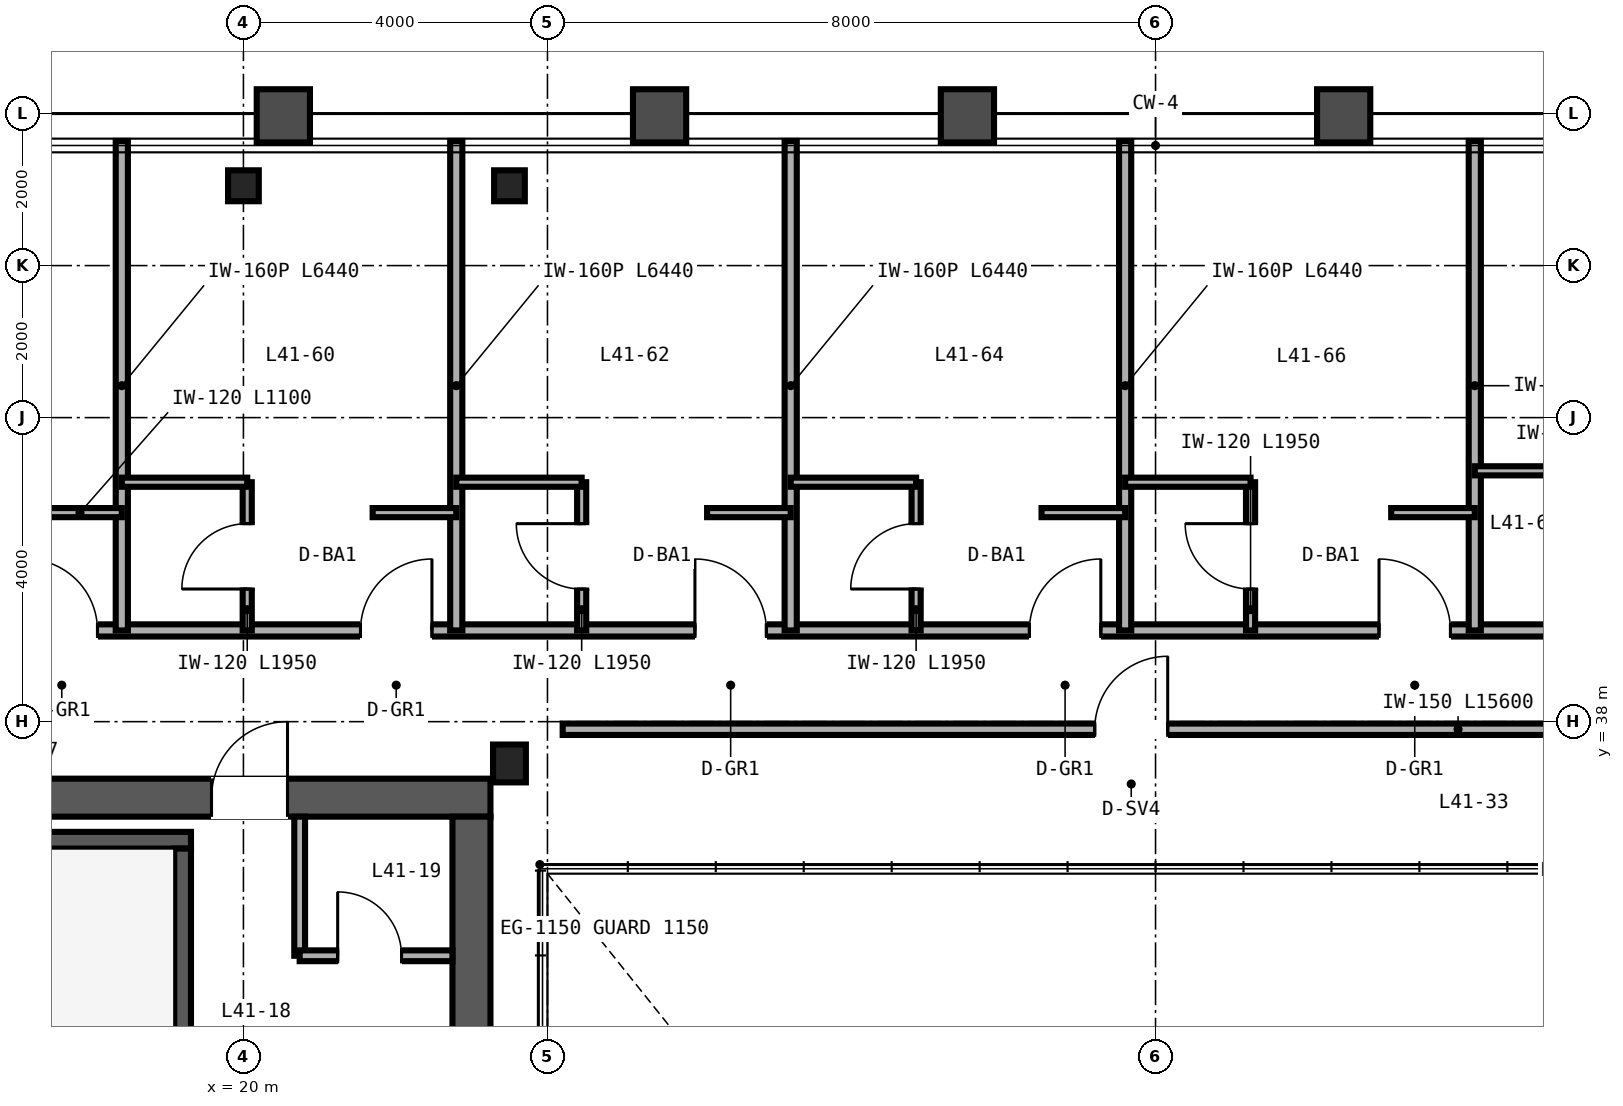
"""IFC4 building model, lengths in metres.
Left out: names, types, materials, properties, quantities, classifications, styles, units other than length and angle.
Written with IfcOpenShell. Run it as: python <this file> out.ifc"""

import sys

from ifc_helpers import new_model, si_unit, direction, frame, frame_2d, origin, origin_2d, place, context, subcontext, project, spatial, rectangle, i_section, extrude, source, transform, mapped, element, fill, save


model = new_model("IFC4")
c1 = context("Model", 3, precision=1e-05, world=origin(), true_north=direction((0.0, 1.0)))
c2 = subcontext(c1, "Body", "Model", "MODEL_VIEW")
j1 = project(units=[si_unit("LENGTHUNIT", "METRE"), si_unit("PLANEANGLEUNIT", "RADIAN")], contexts=[c1])
p1 = place(None, origin())
s1 = spatial("IfcSite", under=j1, at=p1, CompositionType="ELEMENT")
p2 = place(p1, origin())
s2 = spatial("IfcBuilding", under=s1, at=p2, CompositionType="ELEMENT")
p3 = place(p2, frame((0.0, 0.0, 166.8)))
s3 = spatial("IfcBuildingStorey", under=s2, at=p3, CompositionType="ELEMENT", Elevation=166.8)
p4 = place(p3, frame((10.75, 37.0, 0.0), z_axis=(0.0, 0.0, 1.0), x_axis=(1.0, 0.0, 0.0)))
e1 = element("IfcWall", 1, at=p4, inside=s3, PredefinedType="SHEAR", context=c2, shape_type="SweptSolid", body=[
    extrude(rectangle(XDim=12.5, YDim=0.5, at=frame_2d((6.25, 0.0))), origin(), (0.0, 0.0, 1.0), 3.37),
])
p5 = place(p4, frame((8.83, 0.0, 0.0)))
e2 = element("IfcOpeningElement", 2, at=p5, cuts=e1, PredefinedType="OPENING", context=c2, shape_type="SweptSolid", body=[
    extrude(rectangle(XDim=1.0, YDim=2.15, at=frame_2d((0.5, 1.075))), frame((0.0, 0.26, 0.0), z_axis=(0.0, -1.0, 0.0), x_axis=(1.0, 0.0, 0.0)), (0.0, 0.0, 1.0), 0.52),
])
p6 = place(p3, frame((23.0, 15.25, 0.0), z_axis=(0.0, 0.0, 1.0), x_axis=(0.0, 1.0, 0.0)))
e3 = element("IfcWall", 3, at=p6, inside=s3, PredefinedType="SHEAR", context=c2, shape_type="SweptSolid", body=[
    extrude(rectangle(XDim=21.5, YDim=0.5, at=frame_2d((10.75, 0.0))), origin(), (0.0, 0.0, 1.0), 3.37),
])
p7 = place(p3, frame((11.25, 36.44, 0.0), z_axis=(0.0, 0.0, 1.0), x_axis=(1.0, 0.0, 0.0)))
e4 = element("IfcWall", 4, at=p7, inside=s3, PredefinedType="SHEAR", context=c2, shape_type="SweptSolid", body=[
    extrude(rectangle(XDim=8.06, YDim=0.22, at=frame_2d((4.03, 0.0))), origin(), (0.0, 0.0, 1.0), 3.4),
])
p8 = place(p3, frame((19.2, 33.05, 0.0), z_axis=(0.0, 0.0, 1.0), x_axis=(0.0, 1.0, 0.0)))
e5 = element("IfcWall", 5, at=p8, inside=s3, PredefinedType="SHEAR", context=c2, shape_type="SweptSolid", body=[
    extrude(rectangle(XDim=3.28, YDim=0.22, at=frame_2d((1.64, 0.0))), origin(), (0.0, 0.0, 1.0), 3.4),
])
m1 = source(origin(), c2, "Body", "SweptSolid", [
    extrude(i_section(OverallWidth=0.432, OverallDepth=0.498, WebThickness=0.056, FlangeThickness=0.089, FilletRadius=0.025, at=origin_2d()), origin(), (0.0, 0.0, 1.0), 3.37),
])
p9 = place(p3, frame((23.5, 37.45, 0.0), z_axis=(0.0, 0.0, 1.0), x_axis=(1.0, 0.0, 0.0)))
e6 = element("IfcColumn", 6, at=p9, inside=s3, PredefinedType="COLUMN", context=c2, shape_type="MappedRepresentation", body=[
    mapped(m1, transform((0.0, 0.0, 0.0), scale=1.0)),
])
m2 = source(origin(), c2, "Body", "SweptSolid", [
    extrude(i_section(OverallWidth=0.404, OverallDepth=0.407, WebThickness=0.027, FlangeThickness=0.044, FilletRadius=0.025, at=origin_2d()), origin(), (0.0, 0.0, 1.0), 3.37),
])
for number, where, z_axis, x_axis in (
    (7, (20.0, 45.05, 0.0), (0.0, 0.0, 1.0), (1.0, 0.0, 0.0)),
    (8, (23.5, 45.05, 0.0), (0.0, 0.0, 1.0), (1.0, 0.0, 0.0)),
):
    element("IfcColumn", number, at=place(p3, frame(where, z_axis=z_axis, x_axis=x_axis)), inside=s3, PredefinedType="COLUMN", context=c2, shape_type="MappedRepresentation", body=[
        mapped(m2, transform((0.0, 0.0, 0.0), scale=1.0)),
    ])
p10 = place(p3, frame((20.74, 34.92, 0.0), z_axis=(0.0, 0.0, 1.0), x_axis=(0.0, 1.0, 0.0)))
e9 = element("IfcWall", 9, at=p10, inside=s3, PredefinedType="PARTITIONING", context=c2, shape_type="SweptSolid", body=[
    extrude(rectangle(XDim=1.83, YDim=0.142, at=frame_2d((0.915, 0.0))), origin(), (0.0, 0.0, 1.0), 3.37),
])
p11 = place(p3, frame((20.74, 34.92, 0.0), z_axis=(0.0, 0.0, 1.0), x_axis=(1.0, 0.0, 0.0)))
e10 = element("IfcWall", 10, at=p11, inside=s3, PredefinedType="PARTITIONING", context=c2, shape_type="SweptSolid", body=[
    extrude(rectangle(XDim=2.01, YDim=0.142, at=frame_2d((1.005, 0.0))), origin(), (0.0, 0.0, 1.0), 3.37),
])
p12 = place(p11, frame((0.5, 0.0, 0.0)))
e11 = element("IfcOpeningElement", 11, at=p12, cuts=e10, PredefinedType="OPENING", context=c2, shape_type="SweptSolid", body=[
    extrude(rectangle(XDim=0.84, YDim=2.1, at=frame_2d((0.42, 1.05))), frame((0.0, 0.081, 0.0), z_axis=(0.0, -1.0, 0.0), x_axis=(1.0, 0.0, 0.0)), (0.0, 0.0, 1.0), 0.162),
])
p13 = place(p3, frame((24.2, 37.9, 0.0), z_axis=(0.0, 0.0, 1.0), x_axis=(1.0, 0.0, 0.0)))
e12 = element("IfcWall", 12, at=p13, inside=s3, PredefinedType="PARTITIONING", context=c2, shape_type="SweptSolid", body=[
    extrude(rectangle(XDim=15.6, YDim=0.15, at=frame_2d((7.8, 0.0))), origin(), (0.0, 0.0, 1.0), 3.37),
])
p14 = place(p13, frame((7.0, 0.0, 0.0)))
e13 = element("IfcOpeningElement", 13, at=p14, cuts=e12, PredefinedType="OPENING", context=c2, shape_type="SweptSolid", body=[
    extrude(rectangle(XDim=0.96, YDim=2.15, at=frame_2d((0.48, 1.075))), frame((0.0, 0.085, 0.0), z_axis=(0.0, -1.0, 0.0), x_axis=(1.0, 0.0, 0.0)), (0.0, 0.0, 1.0), 0.17),
])
p15 = place(p3, frame((14.0, 39.2, 0.0), z_axis=(0.0, 0.0, 1.0), x_axis=(1.0, 0.0, 0.0)))
e14 = element("IfcWall", 14, at=p15, inside=s3, PredefinedType="PARTITIONING", context=c2, shape_type="SweptSolid", body=[
    extrude(rectangle(XDim=36.0, YDim=0.16, at=frame_2d((18.0, 0.0))), origin(), (0.0, 0.0, 1.0), 2.913),
])
p16 = place(p15, frame((3.14, 0.0, 0.0)))
e15 = element("IfcOpeningElement", 15, at=p16, cuts=e14, PredefinedType="OPENING", context=c2, shape_type="SweptSolid", body=[
    extrude(rectangle(XDim=0.94, YDim=2.15, at=frame_2d((0.47, 1.075))), frame((0.0, 0.09, 0.0), z_axis=(0.0, -1.0, 0.0), x_axis=(1.0, 0.0, 0.0)), (0.0, 0.0, 1.0), 0.18),
])
p17 = place(p15, frame((7.54, 0.0, 0.0)))
e16 = element("IfcOpeningElement", 16, at=p17, cuts=e14, PredefinedType="OPENING", context=c2, shape_type="SweptSolid", body=[
    extrude(rectangle(XDim=0.94, YDim=2.15, at=frame_2d((0.47, 1.075))), frame((0.0, 0.09, 0.0), z_axis=(0.0, -1.0, 0.0), x_axis=(1.0, 0.0, 0.0)), (0.0, 0.0, 1.0), 0.18),
])
p18 = place(p15, frame((11.94, 0.0, 0.0)))
e17 = element("IfcOpeningElement", 17, at=p18, cuts=e14, PredefinedType="OPENING", context=c2, shape_type="SweptSolid", body=[
    extrude(rectangle(XDim=0.94, YDim=2.15, at=frame_2d((0.47, 1.075))), frame((0.0, 0.09, 0.0), z_axis=(0.0, -1.0, 0.0), x_axis=(1.0, 0.0, 0.0)), (0.0, 0.0, 1.0), 0.18),
])
p19 = place(p15, frame((16.34, 0.0, 0.0)))
e18 = element("IfcOpeningElement", 18, at=p19, cuts=e14, PredefinedType="OPENING", context=c2, shape_type="SweptSolid", body=[
    extrude(rectangle(XDim=0.94, YDim=2.15, at=frame_2d((0.47, 1.075))), frame((0.0, 0.09, 0.0), z_axis=(0.0, -1.0, 0.0), x_axis=(1.0, 0.0, 0.0)), (0.0, 0.0, 1.0), 0.18),
])
p20 = place(p15, frame((20.94, 0.0, 0.0)))
e19 = element("IfcOpeningElement", 19, at=p20, cuts=e14, PredefinedType="OPENING", context=c2, shape_type="SweptSolid", body=[
    extrude(rectangle(XDim=0.94, YDim=2.15, at=frame_2d((0.47, 1.075))), frame((0.0, 0.09, 0.0), z_axis=(0.0, -1.0, 0.0), x_axis=(1.0, 0.0, 0.0)), (0.0, 0.0, 1.0), 0.18),
])
p21 = place(p15, frame((25.74, 0.0, 0.0)))
e20 = element("IfcOpeningElement", 20, at=p21, cuts=e14, PredefinedType="OPENING", context=c2, shape_type="SweptSolid", body=[
    extrude(rectangle(XDim=0.94, YDim=2.15, at=frame_2d((0.47, 1.075))), frame((0.0, 0.09, 0.0), z_axis=(0.0, -1.0, 0.0), x_axis=(1.0, 0.0, 0.0)), (0.0, 0.0, 1.0), 0.18),
])
p22 = place(p15, frame((30.24, 0.0, 0.0)))
e21 = element("IfcOpeningElement", 21, at=p22, cuts=e14, PredefinedType="OPENING", context=c2, shape_type="SweptSolid", body=[
    extrude(rectangle(XDim=0.94, YDim=2.15, at=frame_2d((0.47, 1.075))), frame((0.0, 0.09, 0.0), z_axis=(0.0, -1.0, 0.0), x_axis=(1.0, 0.0, 0.0)), (0.0, 0.0, 1.0), 0.18),
])
p23 = place(p15, frame((34.74, 0.0, 0.0)))
e22 = element("IfcOpeningElement", 22, at=p23, cuts=e14, PredefinedType="OPENING", context=c2, shape_type="SweptSolid", body=[
    extrude(rectangle(XDim=0.94, YDim=2.15, at=frame_2d((0.47, 1.075))), frame((0.0, 0.09, 0.0), z_axis=(0.0, -1.0, 0.0), x_axis=(1.0, 0.0, 0.0)), (0.0, 0.0, 1.0), 0.18),
])
p24 = place(p3, frame((18.4, 39.2, 0.0), z_axis=(0.0, 0.0, 1.0), x_axis=(0.0, 1.0, 0.0)))
e23 = element("IfcWall", 23, at=p24, inside=s3, PredefinedType="PARTITIONING", context=c2, shape_type="SweptSolid", body=[
    extrude(rectangle(XDim=6.44, YDim=0.16, at=frame_2d((3.22, 0.0))), origin(), (0.0, 0.0, 1.0), 2.677),
])
p25 = place(p3, frame((17.3, 40.75, 0.0), z_axis=(0.0, 0.0, 1.0), x_axis=(1.0, 0.0, 0.0)))
e24 = element("IfcWall", 24, at=p25, inside=s3, PredefinedType="PARTITIONING", context=c2, shape_type="SweptSolid", body=[
    extrude(rectangle(XDim=1.1, YDim=0.12, at=frame_2d((0.55, 0.0))), origin(), (0.0, 0.0, 1.0), 3.37),
])
p26 = place(p3, frame((22.8, 39.2, 0.0), z_axis=(0.0, 0.0, 1.0), x_axis=(0.0, 1.0, 0.0)))
e25 = element("IfcWall", 25, at=p26, inside=s3, PredefinedType="PARTITIONING", context=c2, shape_type="SweptSolid", body=[
    extrude(rectangle(XDim=6.44, YDim=0.16, at=frame_2d((3.22, 0.0))), origin(), (0.0, 0.0, 1.0), 2.833),
])
p27 = place(p3, frame((20.05, 39.2, 0.0), z_axis=(0.0, 0.0, 1.0), x_axis=(0.0, 1.0, 0.0)))
e26 = element("IfcWall", 26, at=p27, inside=s3, PredefinedType="PARTITIONING", context=c2, shape_type="SweptSolid", body=[
    extrude(rectangle(XDim=1.95, YDim=0.12, at=frame_2d((0.975, 0.0))), origin(), (0.0, 0.0, 1.0), 3.37),
])
p28 = place(p27, frame((0.545, 0.0, 0.0)))
e27 = element("IfcOpeningElement", 27, at=p28, cuts=e26, PredefinedType="OPENING", context=c2, shape_type="SweptSolid", body=[
    extrude(rectangle(XDim=0.86, YDim=2.1, at=frame_2d((0.43, 1.05))), frame((0.0, 0.07, 0.0), z_axis=(0.0, -1.0, 0.0), x_axis=(1.0, 0.0, 0.0)), (0.0, 0.0, 1.0), 0.14),
])
p29 = place(p3, frame((18.4, 41.15, 0.0), z_axis=(0.0, 0.0, 1.0), x_axis=(1.0, 0.0, 0.0)))
e28 = element("IfcWall", 28, at=p29, inside=s3, PredefinedType="PARTITIONING", context=c2, shape_type="SweptSolid", body=[
    extrude(rectangle(XDim=1.65, YDim=0.12, at=frame_2d((0.825, 0.0))), origin(), (0.0, 0.0, 1.0), 3.37),
])
p30 = place(p3, frame((21.7, 40.75, 0.0), z_axis=(0.0, 0.0, 1.0), x_axis=(1.0, 0.0, 0.0)))
e29 = element("IfcWall", 29, at=p30, inside=s3, PredefinedType="PARTITIONING", context=c2, shape_type="SweptSolid", body=[
    extrude(rectangle(XDim=1.1, YDim=0.12, at=frame_2d((0.55, 0.0))), origin(), (0.0, 0.0, 1.0), 3.37),
])
p31 = place(p3, frame((27.2, 39.2, 0.0), z_axis=(0.0, 0.0, 1.0), x_axis=(0.0, 1.0, 0.0)))
e30 = element("IfcWall", 30, at=p31, inside=s3, PredefinedType="PARTITIONING", context=c2, shape_type="SweptSolid", body=[
    extrude(rectangle(XDim=6.44, YDim=0.16, at=frame_2d((3.22, 0.0))), origin(), (0.0, 0.0, 1.0), 2.443),
])
p32 = place(p3, frame((24.45, 39.2, 0.0), z_axis=(0.0, 0.0, 1.0), x_axis=(0.0, 1.0, 0.0)))
e31 = element("IfcWall", 31, at=p32, inside=s3, PredefinedType="PARTITIONING", context=c2, shape_type="SweptSolid", body=[
    extrude(rectangle(XDim=1.95, YDim=0.12, at=frame_2d((0.975, 0.0))), origin(), (0.0, 0.0, 1.0), 3.37),
])
p33 = place(p32, frame((0.545, 0.0, 0.0)))
e32 = element("IfcOpeningElement", 32, at=p33, cuts=e31, PredefinedType="OPENING", context=c2, shape_type="SweptSolid", body=[
    extrude(rectangle(XDim=0.86, YDim=2.1, at=frame_2d((0.43, 1.05))), frame((0.0, 0.07, 0.0), z_axis=(0.0, -1.0, 0.0), x_axis=(1.0, 0.0, 0.0)), (0.0, 0.0, 1.0), 0.14),
])
p34 = place(p3, frame((22.8, 41.15, 0.0), z_axis=(0.0, 0.0, 1.0), x_axis=(1.0, 0.0, 0.0)))
e33 = element("IfcWall", 33, at=p34, inside=s3, PredefinedType="PARTITIONING", context=c2, shape_type="SweptSolid", body=[
    extrude(rectangle(XDim=1.65, YDim=0.12, at=frame_2d((0.825, 0.0))), origin(), (0.0, 0.0, 1.0), 2.913),
])
p35 = place(p3, frame((26.1, 40.75, 0.0), z_axis=(0.0, 0.0, 1.0), x_axis=(1.0, 0.0, 0.0)))
e34 = element("IfcWall", 34, at=p35, inside=s3, PredefinedType="PARTITIONING", context=c2, shape_type="SweptSolid", body=[
    extrude(rectangle(XDim=1.1, YDim=0.12, at=frame_2d((0.55, 0.0))), origin(), (0.0, 0.0, 1.0), 3.37),
])
p36 = place(p3, frame((31.6, 39.2, 0.0), z_axis=(0.0, 0.0, 1.0), x_axis=(0.0, 1.0, 0.0)))
e35 = element("IfcWall", 35, at=p36, inside=s3, PredefinedType="PARTITIONING", context=c2, shape_type="SweptSolid", body=[
    extrude(rectangle(XDim=6.44, YDim=0.16, at=frame_2d((3.22, 0.0))), origin(), (0.0, 0.0, 1.0), 2.443),
])
p37 = place(p3, frame((28.85, 39.2, 0.0), z_axis=(0.0, 0.0, 1.0), x_axis=(0.0, 1.0, 0.0)))
e36 = element("IfcWall", 36, at=p37, inside=s3, PredefinedType="PARTITIONING", context=c2, shape_type="SweptSolid", body=[
    extrude(rectangle(XDim=1.95, YDim=0.12, at=frame_2d((0.975, 0.0))), origin(), (0.0, 0.0, 1.0), 3.37),
])
p38 = place(p37, frame((0.545, 0.0, 0.0)))
e37 = element("IfcOpeningElement", 37, at=p38, cuts=e36, PredefinedType="OPENING", context=c2, shape_type="SweptSolid", body=[
    extrude(rectangle(XDim=0.86, YDim=2.1, at=frame_2d((0.43, 1.05))), frame((0.0, 0.07, 0.0), z_axis=(0.0, -1.0, 0.0), x_axis=(1.0, 0.0, 0.0)), (0.0, 0.0, 1.0), 0.14),
])
p39 = place(p3, frame((27.2, 41.15, 0.0), z_axis=(0.0, 0.0, 1.0), x_axis=(1.0, 0.0, 0.0)))
e38 = element("IfcWall", 38, at=p39, inside=s3, PredefinedType="PARTITIONING", context=c2, shape_type="SweptSolid", body=[
    extrude(rectangle(XDim=1.65, YDim=0.12, at=frame_2d((0.825, 0.0))), origin(), (0.0, 0.0, 1.0), 3.37),
])
p40 = place(p3, frame((30.5, 40.75, 0.0), z_axis=(0.0, 0.0, 1.0), x_axis=(1.0, 0.0, 0.0)))
e39 = element("IfcWall", 39, at=p40, inside=s3, PredefinedType="PARTITIONING", context=c2, shape_type="SweptSolid", body=[
    extrude(rectangle(XDim=1.1, YDim=0.12, at=frame_2d((0.55, 0.0))), origin(), (0.0, 0.0, 1.0), 3.37),
])
p41 = place(p3, frame((36.2, 39.2, 0.0), z_axis=(0.0, 0.0, 1.0), x_axis=(0.0, 1.0, 0.0)))
e40 = element("IfcWall", 40, at=p41, inside=s3, PredefinedType="PARTITIONING", context=c2, shape_type="SweptSolid", body=[
    extrude(rectangle(XDim=6.44, YDim=0.16, at=frame_2d((3.22, 0.0))), origin(), (0.0, 0.0, 1.0), 2.443),
])
p42 = place(p3, frame((33.25, 39.2, 0.0), z_axis=(0.0, 0.0, 1.0), x_axis=(0.0, 1.0, 0.0)))
e41 = element("IfcWall", 41, at=p42, inside=s3, PredefinedType="PARTITIONING", context=c2, shape_type="SweptSolid", body=[
    extrude(rectangle(XDim=1.95, YDim=0.12, at=frame_2d((0.975, 0.0))), origin(), (0.0, 0.0, 1.0), 3.37),
])
p43 = place(p42, frame((0.545, 0.0, 0.0)))
e42 = element("IfcOpeningElement", 42, at=p43, cuts=e41, PredefinedType="OPENING", context=c2, shape_type="SweptSolid", body=[
    extrude(rectangle(XDim=0.86, YDim=2.1, at=frame_2d((0.43, 1.05))), frame((0.0, 0.07, 0.0), z_axis=(0.0, -1.0, 0.0), x_axis=(1.0, 0.0, 0.0)), (0.0, 0.0, 1.0), 0.14),
])
p44 = place(p3, frame((31.6, 41.15, 0.0), z_axis=(0.0, 0.0, 1.0), x_axis=(1.0, 0.0, 0.0)))
e43 = element("IfcWall", 43, at=p44, inside=s3, PredefinedType="PARTITIONING", context=c2, shape_type="SweptSolid", body=[
    extrude(rectangle(XDim=1.65, YDim=0.12, at=frame_2d((0.825, 0.0))), origin(), (0.0, 0.0, 1.0), 3.37),
])
p45 = place(p3, frame((35.1, 40.75, 0.0), z_axis=(0.0, 0.0, 1.0), x_axis=(1.0, 0.0, 0.0)))
e44 = element("IfcWall", 44, at=p45, inside=s3, PredefinedType="PARTITIONING", context=c2, shape_type="SweptSolid", body=[
    extrude(rectangle(XDim=1.1, YDim=0.12, at=frame_2d((0.55, 0.0))), origin(), (0.0, 0.0, 1.0), 3.37),
])
p46 = place(p3, frame((36.2, 41.3, 0.0), z_axis=(0.0, 0.0, 1.0), x_axis=(1.0, 0.0, 0.0)))
e45 = element("IfcWall", 45, at=p46, inside=s3, PredefinedType="PARTITIONING", context=c2, shape_type="SweptSolid", body=[
    extrude(rectangle(XDim=1.95, YDim=0.12, at=frame_2d((0.975, 0.0))), origin(), (0.0, 0.0, 1.0), 3.37),
])
m3 = source(origin(), c2, "Body", "SweptSolid", [
    extrude(rectangle(XDim=0.84, YDim=2.1, at=frame_2d((0.42, 1.05))), frame((0.0, 0.025, 0.0), z_axis=(0.0, -1.0, 0.0), x_axis=(1.0, 0.0, 0.0)), (0.0, 0.0, 1.0), 0.05),
])
p47 = place(p12, origin())
e46 = element("IfcDoor", 46, at=p47, inside=s3, OperationType="SINGLE_SWING_LEFT", PredefinedType="DOOR", context=c2, shape_type="MappedRepresentation", body=[
    mapped(m3, transform((0.0, 0.0, 0.0), scale=1.0)),
])
fill(e11, e46)
m4 = source(origin(), c2, "Body", "SweptSolid", [
    extrude(rectangle(XDim=1.0, YDim=2.15, at=frame_2d((0.5, 1.075))), frame((0.0, 0.025, 0.0), z_axis=(0.0, -1.0, 0.0), x_axis=(1.0, 0.0, 0.0)), (0.0, 0.0, 1.0), 0.05),
])
p48 = place(p5, origin())
e47 = element("IfcDoor", 47, at=p48, inside=s3, OperationType="SINGLE_SWING_RIGHT", PredefinedType="DOOR", context=c2, shape_type="MappedRepresentation", body=[
    mapped(m4, transform((0.0, 0.0, 0.0), scale=1.0)),
])
fill(e2, e47)
m5 = source(origin(), c2, "Body", "SweptSolid", [
    extrude(rectangle(XDim=0.96, YDim=2.15, at=frame_2d((0.48, 1.075))), frame((0.0, 0.025, 0.0), z_axis=(0.0, -1.0, 0.0), x_axis=(1.0, 0.0, 0.0)), (0.0, 0.0, 1.0), 0.05),
])
p49 = place(p14, origin())
e48 = element("IfcDoor", 48, at=p49, inside=s3, OperationType="SINGLE_SWING_RIGHT", PredefinedType="DOOR", context=c2, shape_type="MappedRepresentation", body=[
    mapped(m5, transform((0.0, 0.0, 0.0), scale=1.0)),
])
fill(e13, e48)
m6 = source(origin(), c2, "Body", "SweptSolid", [
    extrude(rectangle(XDim=0.86, YDim=2.1, at=frame_2d((0.43, 1.05))), frame((0.0, 0.025, 0.0), z_axis=(0.0, -1.0, 0.0), x_axis=(1.0, 0.0, 0.0)), (0.0, 0.0, 1.0), 0.05),
])
p50 = place(p28, origin())
e49 = element("IfcDoor", 49, at=p50, inside=s3, OperationType="SINGLE_SWING_LEFT", PredefinedType="DOOR", context=c2, shape_type="MappedRepresentation", body=[
    mapped(m6, transform((0.0, 0.0, 0.0), scale=1.0)),
])
fill(e27, e49)
p51 = place(p33, origin())
e50 = element("IfcDoor", 50, at=p51, inside=s3, OperationType="SINGLE_SWING_RIGHT", PredefinedType="DOOR", context=c2, shape_type="MappedRepresentation", body=[
    mapped(m6, transform((0.0, 0.0, 0.0), scale=1.0)),
])
fill(e32, e50)
p52 = place(p38, origin())
e51 = element("IfcDoor", 51, at=p52, inside=s3, OperationType="SINGLE_SWING_LEFT", PredefinedType="DOOR", context=c2, shape_type="MappedRepresentation", body=[
    mapped(m6, transform((0.0, 0.0, 0.0), scale=1.0)),
])
fill(e37, e51)
p53 = place(p43, origin())
e52 = element("IfcDoor", 52, at=p53, inside=s3, OperationType="SINGLE_SWING_RIGHT", PredefinedType="DOOR", context=c2, shape_type="MappedRepresentation", body=[
    mapped(m6, transform((0.0, 0.0, 0.0), scale=1.0)),
])
fill(e42, e52)
m7 = source(origin(), c2, "Body", "SweptSolid", [
    extrude(rectangle(XDim=0.94, YDim=2.15, at=frame_2d((0.47, 1.075))), frame((0.0, 0.025, 0.0), z_axis=(0.0, -1.0, 0.0), x_axis=(1.0, 0.0, 0.0)), (0.0, 0.0, 1.0), 0.05),
])
p54 = place(p16, origin())
e53 = element("IfcDoor", 53, at=p54, inside=s3, OperationType="SINGLE_SWING_LEFT", PredefinedType="DOOR", context=c2, shape_type="MappedRepresentation", body=[
    mapped(m7, transform((0.0, 0.0, 0.0), scale=1.0)),
])
fill(e15, e53)
p55 = place(p17, origin())
e54 = element("IfcDoor", 54, at=p55, inside=s3, OperationType="SINGLE_SWING_RIGHT", PredefinedType="DOOR", context=c2, shape_type="MappedRepresentation", body=[
    mapped(m7, transform((0.0, 0.0, 0.0), scale=1.0)),
])
fill(e16, e54)
p56 = place(p18, origin())
e55 = element("IfcDoor", 55, at=p56, inside=s3, OperationType="SINGLE_SWING_LEFT", PredefinedType="DOOR", context=c2, shape_type="MappedRepresentation", body=[
    mapped(m7, transform((0.0, 0.0, 0.0), scale=1.0)),
])
fill(e17, e55)
p57 = place(p19, origin())
e56 = element("IfcDoor", 56, at=p57, inside=s3, OperationType="SINGLE_SWING_RIGHT", PredefinedType="DOOR", context=c2, shape_type="MappedRepresentation", body=[
    mapped(m7, transform((0.0, 0.0, 0.0), scale=1.0)),
])
fill(e18, e56)
p58 = place(p20, origin())
e57 = element("IfcDoor", 57, at=p58, inside=s3, OperationType="SINGLE_SWING_LEFT", PredefinedType="DOOR", context=c2, shape_type="MappedRepresentation", body=[
    mapped(m7, transform((0.0, 0.0, 0.0), scale=1.0)),
])
fill(e19, e57)
save(model, sys.argv[1])
